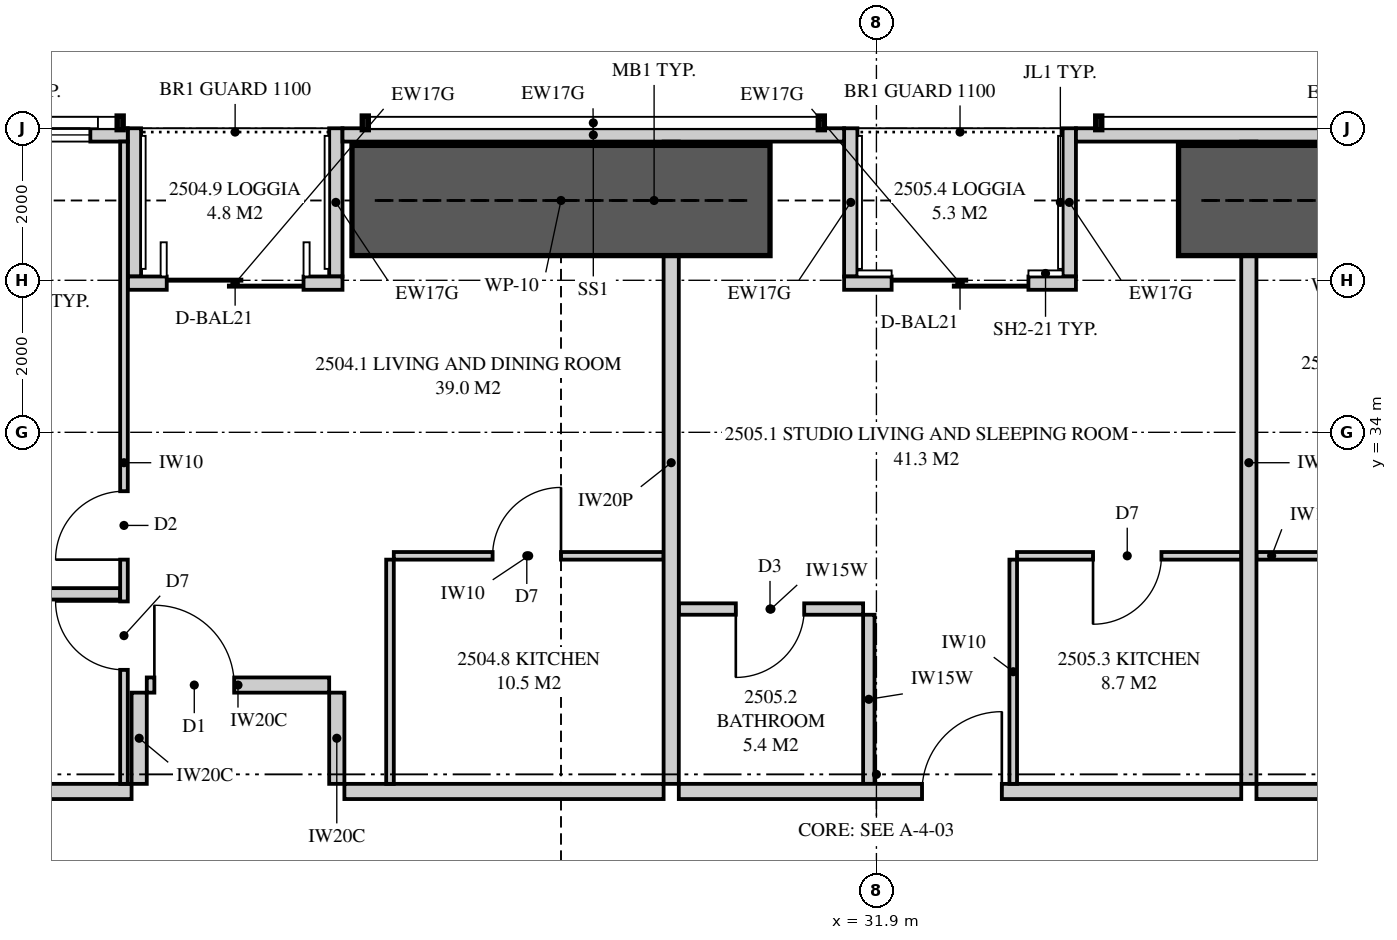
"""IFC4 building model, lengths in metres.
Left out: names, types, materials, properties, quantities, classifications, styles, units other than length and angle.
Written with IfcOpenShell. Run it as: python <this file> out.ifc"""

import sys

from ifc_helpers import new_model, si_unit, direction, frame, frame_2d, origin, place, context, subcontext, project, spatial, polyline, rectangle, outline, extrude, element, fill, save


model = new_model("IFC4")
c1 = context("Model", 3, precision=1e-05, world=origin(), true_north=direction((0.0, 1.0)))
c2 = subcontext(c1, "Body", "Model", "MODEL_VIEW")
j1 = project(units=[si_unit("LENGTHUNIT", "METRE"), si_unit("PLANEANGLEUNIT", "RADIAN")], contexts=[c1])
p1 = place(None, origin())
s1 = spatial("IfcSite", under=j1, at=p1, CompositionType="ELEMENT")
p2 = place(p1, origin())
s2 = spatial("IfcBuilding", under=s1, at=p2, CompositionType="ELEMENT")
p3 = place(p2, frame((0.0, 0.0, 94.8)))
s3 = spatial("IfcBuildingStorey", under=s2, at=p3, CompositionType="ELEMENT", Elevation=94.8)
p4 = place(p3, frame((41.449, 37.913, 0.0), z_axis=(0.0, 0.0, 1.0), x_axis=(-1.0, 0.0, 0.0)))
e1 = element("IfcWall", 1, at=p4, inside=s3, PredefinedType="SOLIDWALL", context=c2, shape_type="SweptSolid", body=[
    extrude(outline(polyline([(0.0, 0.0), (6.924, 0.0), (6.924, 2.15), (2.824, 2.15), (2.824, 3.11), (2.666, 3.11), (2.666, 2.15), (2.62, 2.15), (2.62, 3.11), (0.0, 3.11), (0.0, 0.0)])), frame((0.0, 0.087, 0.0), z_axis=(0.0, -1.0, 0.0), x_axis=(1.0, 0.0, 0.0)), (0.0, 0.0, 1.0), 0.175),
])
p5 = place(p3, frame((31.475, 37.913, 0.0), z_axis=(0.0, 0.0, 1.0), x_axis=(-1.0, 0.0, 0.0)))
e2 = element("IfcWall", 2, at=p5, inside=s3, PredefinedType="SOLIDWALL", context=c2, shape_type="SweptSolid", body=[
    extrude(rectangle(XDim=6.6, YDim=0.175, at=frame_2d((3.3, 0.0))), origin(), (0.0, 0.0, 1.0), 2.15),
])
p6 = place(p3, frame((22.05, 37.913, 0.0), z_axis=(0.0, 0.0, 1.0), x_axis=(-1.0, 0.0, 0.0)))
e3 = element("IfcWall", 3, at=p6, inside=s3, PredefinedType="SOLIDWALL", context=c2, shape_type="SweptSolid", body=[
    extrude(outline(polyline([(0.0, 0.0), (12.999, 0.0), (12.999, 3.11), (5.378, 3.11), (5.378, 2.15), (5.333, 2.15), (5.333, 3.11), (5.175, 3.11), (5.175, 2.15), (0.0, 2.15), (0.0, 0.0)])), frame((0.0, 0.087, 0.0), z_axis=(0.0, -1.0, 0.0), x_axis=(1.0, 0.0, 0.0)), (0.0, 0.0, 1.0), 0.175),
])
p7 = place(p6, frame((0.492, 0.0, 0.4)))
e4 = element("IfcOpeningElement", 4, at=p7, cuts=e3, PredefinedType="OPENING", context=c2, shape_type="SweptSolid", body=[
    extrude(rectangle(XDim=1.8, YDim=1.7, at=frame_2d((0.9, 0.85))), frame((0.0, 0.097, 0.0), z_axis=(0.0, -1.0, 0.0), x_axis=(1.0, 0.0, 0.0)), (0.0, 0.0, 1.0), 0.195),
])
p8 = place(p6, frame((8.065, 0.0, 0.4)))
e5 = element("IfcOpeningElement", 5, at=p8, cuts=e3, PredefinedType="OPENING", context=c2, shape_type="SweptSolid", body=[
    extrude(rectangle(XDim=1.8, YDim=1.7, at=frame_2d((0.9, 0.85))), frame((0.0, 0.097, 0.0), z_axis=(0.0, -1.0, 0.0), x_axis=(1.0, 0.0, 0.0)), (0.0, 0.0, 1.0), 0.195),
])
p9 = place(p3, frame((34.525, 35.962, 0.0), z_axis=(0.0, 0.0, 1.0), x_axis=(-1.0, 0.0, 0.0)))
e6 = element("IfcWall", 6, at=p9, inside=s3, PredefinedType="SOLIDWALL", context=c2, shape_type="SweptSolid", body=[
    extrude(rectangle(XDim=3.05, YDim=0.175, at=frame_2d((1.525, 0.0))), origin(), (0.0, 0.0, 1.0), 3.11),
])
p10 = place(p9, frame((0.625, 0.0, 0.0)))
e7 = element("IfcOpeningElement", 7, at=p10, cuts=e6, PredefinedType="OPENING", context=c2, shape_type="SweptSolid", body=[
    extrude(rectangle(XDim=1.8, YDim=2.1, at=frame_2d((0.9, 1.05))), frame((0.0, 0.097, 0.0), z_axis=(0.0, -1.0, 0.0), x_axis=(1.0, 0.0, 0.0)), (0.0, 0.0, 1.0), 0.195),
])
for number, where, z_axis, x_axis in (
    (8, (34.438, 38.0, 0.0), (0.0, 0.0, 1.0), (0.0, -1.0, 0.0)),
    (9, (31.562, 38.0, 0.0), (0.0, 0.0, 1.0), (0.0, -1.0, 0.0)),
):
    element("IfcWall", number, at=place(p3, frame(where, z_axis=z_axis, x_axis=x_axis)), inside=s3, PredefinedType="SOLIDWALL", context=c2, shape_type="SweptSolid", body=[
        extrude(outline(polyline([(0.0, 0.0), (1.95, 0.0), (1.95, 3.11), (1.75, 3.11), (1.75, 2.15), (0.15, 2.15), (0.15, 3.11), (0.0, 3.11), (0.0, 0.0)])), frame((0.0, 0.087, 0.0), z_axis=(0.0, -1.0, 0.0), x_axis=(1.0, 0.0, 0.0)), (0.0, 0.0, 1.0), 0.175),
    ])
p11 = place(p3, frame((24.875, 35.962, 0.0), z_axis=(0.0, 0.0, 1.0), x_axis=(-1.0, 0.0, 0.0)))
e10 = element("IfcWall", 10, at=p11, inside=s3, PredefinedType="SOLIDWALL", context=c2, shape_type="SweptSolid", body=[
    extrude(rectangle(XDim=2.825, YDim=0.175, at=frame_2d((1.413, 0.0))), origin(), (0.0, 0.0, 1.0), 3.11),
])
p12 = place(p11, frame((0.512, 0.0, 0.0)))
e11 = element("IfcOpeningElement", 11, at=p12, cuts=e10, PredefinedType="OPENING", context=c2, shape_type="SweptSolid", body=[
    extrude(rectangle(XDim=1.8, YDim=2.1, at=frame_2d((0.9, 1.05))), frame((0.0, 0.097, 0.0), z_axis=(0.0, -1.0, 0.0), x_axis=(1.0, 0.0, 0.0)), (0.0, 0.0, 1.0), 0.195),
])
for number, where, z_axis, x_axis in (
    (12, (24.788, 38.0, 0.0), (0.0, 0.0, 1.0), (0.0, -1.0, 0.0)),
    (13, (22.137, 38.0, 0.0), (0.0, 0.0, 1.0), (0.0, -1.0, 0.0)),
):
    element("IfcWall", number, at=place(p3, frame(where, z_axis=z_axis, x_axis=x_axis)), inside=s3, PredefinedType="SOLIDWALL", context=c2, shape_type="SweptSolid", body=[
        extrude(outline(polyline([(0.0, 0.0), (1.95, 0.0), (1.95, 3.11), (1.75, 3.11), (1.75, 2.15), (0.15, 2.15), (0.15, 3.11), (0.0, 3.11), (0.0, 0.0)])), frame((0.0, 0.087, 0.0), z_axis=(0.0, -1.0, 0.0), x_axis=(1.0, 0.0, 0.0)), (0.0, 0.0, 1.0), 0.175),
    ])
p13 = place(p3, frame((29.2, 37.825, 0.0), z_axis=(0.0, 0.0, 1.0), x_axis=(0.0, -1.0, 0.0)))
e14 = element("IfcWall", 14, at=p13, inside=s3, PredefinedType="PARTITIONING", context=c2, shape_type="SweptSolid", body=[
    extrude(outline(polyline([(0.529, 2.15), (0.0, 2.15), (0.0, 0.0), (0.529, 0.0), (0.529, 0.513), (1.021, 0.513), (1.021, 0.0), (8.45, 0.0), (8.45, 3.11), (1.685, 3.11), (1.685, 2.15), (1.021, 2.15), (1.021, 1.637), (0.529, 1.637), (0.529, 2.15)])), frame((0.0, 0.1, 0.0), z_axis=(0.0, -1.0, 0.0), x_axis=(1.0, 0.0, 0.0)), (0.0, 0.0, 1.0), 0.2),
])
p14 = place(p3, frame((17.775, 29.275, 0.0), z_axis=(0.0, 0.0, 1.0), x_axis=(1.0, 0.0, 0.0)))
e15 = element("IfcWall", 15, at=p14, inside=s3, PredefinedType="PARTITIONING", context=c2, shape_type="SweptSolid", body=[
    extrude(rectangle(XDim=4.325, YDim=0.2, at=frame_2d((2.163, 0.0))), origin(), (0.0, 0.0, 1.0), 3.11),
])
p15 = place(p3, frame((22.0, 37.825, 0.0), z_axis=(0.0, 0.0, 1.0), x_axis=(0.0, -1.0, 0.0)))
e16 = element("IfcWall", 16, at=p15, inside=s3, PredefinedType="PARTITIONING", context=c2, shape_type="SweptSolid", body=[
    extrude(outline(polyline([(0.0, 0.0), (8.45, 0.0), (8.45, 3.11), (1.635, 3.11), (1.635, 2.15), (0.0, 2.15), (0.0, 3.11), (0.0, 0.0)])), frame((0.0, 0.05, 0.0), z_axis=(0.0, -1.0, 0.0), x_axis=(1.0, 0.0, 0.0)), (0.0, 0.0, 1.0), 0.1),
])
p16 = place(p15, frame((4.6, 0.0, 0.0)))
e17 = element("IfcOpeningElement", 17, at=p16, cuts=e16, PredefinedType="OPENING", context=c2, shape_type="SweptSolid", body=[
    extrude(rectangle(XDim=0.9, YDim=2.1, at=frame_2d((0.45, 1.05))), frame((0.0, 0.06, 0.0), z_axis=(0.0, -1.0, 0.0), x_axis=(1.0, 0.0, 0.0)), (0.0, 0.0, 1.0), 0.12),
])
p17 = place(p15, frame((6.05, 0.0, 0.0)))
e18 = element("IfcOpeningElement", 18, at=p17, cuts=e16, PredefinedType="OPENING", context=c2, shape_type="SweptSolid", body=[
    extrude(rectangle(XDim=0.9, YDim=2.1, at=frame_2d((0.45, 1.05))), frame((0.0, 0.06, 0.0), z_axis=(0.0, -1.0, 0.0), x_axis=(1.0, 0.0, 0.0)), (0.0, 0.0, 1.0), 0.12),
])
p18 = place(p3, frame((17.75, 31.875, 0.0), z_axis=(0.0, 0.0, 1.0), x_axis=(1.0, 0.0, 0.0)))
e19 = element("IfcWall", 19, at=p18, inside=s3, PredefinedType="PLUMBINGWALL", context=c2, shape_type="SweptSolid", body=[
    extrude(rectangle(XDim=4.2, YDim=0.15, at=frame_2d((2.1, 0.0))), origin(), (0.0, 0.0, 1.0), 3.11),
])
p19 = place(p3, frame((25.55, 32.375, 0.0), z_axis=(0.0, 0.0, 1.0), x_axis=(1.0, 0.0, 0.0)))
e20 = element("IfcWall", 20, at=p19, inside=s3, PredefinedType="PARTITIONING", context=c2, shape_type="SweptSolid", body=[
    extrude(outline(polyline([(0.0, 0.0), (3.55, 0.0), (3.55, 3.11), (2.487, 3.11), (2.487, 2.541), (1.913, 2.541), (1.913, 3.11), (0.0, 3.11), (0.0, 0.0)])), frame((0.0, 0.05, 0.0), z_axis=(0.0, -1.0, 0.0), x_axis=(1.0, 0.0, 0.0)), (0.0, 0.0, 1.0), 0.1),
])
p20 = place(p19, frame((1.3, 0.0, 0.0)))
e21 = element("IfcOpeningElement", 21, at=p20, cuts=e20, PredefinedType="OPENING", context=c2, shape_type="SweptSolid", body=[
    extrude(rectangle(XDim=0.9, YDim=2.1, at=frame_2d((0.45, 1.05))), frame((0.0, 0.06, 0.0), z_axis=(0.0, -1.0, 0.0), x_axis=(1.0, 0.0, 0.0)), (0.0, 0.0, 1.0), 0.12),
])
p21 = place(p3, frame((25.5, 32.325, 0.0), z_axis=(0.0, 0.0, 1.0), x_axis=(0.0, -1.0, 0.0)))
e22 = element("IfcWall", 22, at=p21, inside=s3, PredefinedType="PARTITIONING", context=c2, shape_type="SweptSolid", body=[
    extrude(rectangle(XDim=2.95, YDim=0.1, at=frame_2d((1.475, 0.0))), origin(), (0.0, 0.0, 1.0), 3.11),
])
p22 = place(p3, frame((36.8, 37.825, 0.0), z_axis=(0.0, 0.0, 1.0), x_axis=(0.0, -1.0, 0.0)))
e23 = element("IfcWall", 23, at=p22, inside=s3, PredefinedType="PARTITIONING", context=c2, shape_type="SweptSolid", body=[
    extrude(outline(polyline([(0.529, 2.15), (0.0, 2.15), (0.0, 0.0), (0.529, 0.0), (0.529, 0.256), (1.021, 0.256), (1.021, 0.0), (8.45, 0.0), (8.45, 3.11), (1.685, 3.11), (1.685, 2.15), (1.021, 2.15), (1.021, 1.894), (0.529, 1.894), (0.529, 2.15)])), frame((0.0, 0.1, 0.0), z_axis=(0.0, -1.0, 0.0), x_axis=(1.0, 0.0, 0.0)), (0.0, 0.0, 1.0), 0.2),
])
p23 = place(p3, frame((29.3, 29.275, 0.0), z_axis=(0.0, 0.0, 1.0), x_axis=(1.0, 0.0, 0.0)))
e24 = element("IfcWall", 24, at=p23, inside=s3, PredefinedType="PARTITIONING", context=c2, shape_type="SweptSolid", body=[
    extrude(rectangle(XDim=7.4, YDim=0.2, at=frame_2d((3.7, 0.0))), origin(), (0.0, 0.0, 1.0), 3.11),
])
p24 = place(p23, frame((3.2, 0.0, 0.0)))
e25 = element("IfcOpeningElement", 25, at=p24, cuts=e24, PredefinedType="OPENING", context=c2, shape_type="SweptSolid", body=[
    extrude(rectangle(XDim=1.05, YDim=2.2, at=frame_2d((0.525, 1.1))), frame((0.0, 0.11, 0.0), z_axis=(0.0, -1.0, 0.0), x_axis=(1.0, 0.0, 0.0)), (0.0, 0.0, 1.0), 0.22),
])
p25 = place(p3, frame((29.3, 31.675, 0.0), z_axis=(0.0, 0.0, 1.0), x_axis=(1.0, 0.0, 0.0)))
e26 = element("IfcWall", 26, at=p25, inside=s3, PredefinedType="PLUMBINGWALL", context=c2, shape_type="SweptSolid", body=[
    extrude(rectangle(XDim=2.425, YDim=0.15, at=frame_2d((1.212, 0.0))), origin(), (0.0, 0.0, 1.0), 3.11),
])
p26 = place(p25, frame((0.75, 0.0, 0.0)))
e27 = element("IfcOpeningElement", 27, at=p26, cuts=e26, PredefinedType="OPENING", context=c2, shape_type="SweptSolid", body=[
    extrude(rectangle(XDim=0.9, YDim=2.1, at=frame_2d((0.45, 1.05))), frame((0.0, 0.085, 0.0), z_axis=(0.0, -1.0, 0.0), x_axis=(1.0, 0.0, 0.0)), (0.0, 0.0, 1.0), 0.17),
])
p27 = place(p3, frame((31.8, 31.6, 0.0), z_axis=(0.0, 0.0, 1.0), x_axis=(0.0, -1.0, 0.0)))
e28 = element("IfcWall", 28, at=p27, inside=s3, PredefinedType="PLUMBINGWALL", context=c2, shape_type="SweptSolid", body=[
    extrude(rectangle(XDim=2.225, YDim=0.15, at=frame_2d((1.113, 0.0))), origin(), (0.0, 0.0, 1.0), 3.11),
])
p28 = place(p3, frame((33.75, 32.375, 0.0), z_axis=(0.0, 0.0, 1.0), x_axis=(1.0, 0.0, 0.0)))
e29 = element("IfcWall", 29, at=p28, inside=s3, PredefinedType="PARTITIONING", context=c2, shape_type="SweptSolid", body=[
    extrude(rectangle(XDim=2.95, YDim=0.1, at=frame_2d((1.475, 0.0))), origin(), (0.0, 0.0, 1.0), 3.11),
])
p29 = place(p28, frame((1.0, 0.0, 0.0)))
e30 = element("IfcOpeningElement", 30, at=p29, cuts=e29, PredefinedType="OPENING", context=c2, shape_type="SweptSolid", body=[
    extrude(rectangle(XDim=0.9, YDim=2.1, at=frame_2d((0.45, 1.05))), frame((0.0, 0.06, 0.0), z_axis=(0.0, -1.0, 0.0), x_axis=(1.0, 0.0, 0.0)), (0.0, 0.0, 1.0), 0.12),
])
p30 = place(p3, frame((33.7, 32.325, 0.0), z_axis=(0.0, 0.0, 1.0), x_axis=(0.0, -1.0, 0.0)))
e31 = element("IfcWall", 31, at=p30, inside=s3, PredefinedType="PARTITIONING", context=c2, shape_type="SweptSolid", body=[
    extrude(rectangle(XDim=2.95, YDim=0.1, at=frame_2d((1.475, 0.0))), origin(), (0.0, 0.0, 1.0), 3.11),
])
p31 = place(p3, frame((36.9, 29.275, 0.0), z_axis=(0.0, 0.0, 1.0), x_axis=(1.0, 0.0, 0.0)))
e32 = element("IfcWall", 32, at=p31, inside=s3, PredefinedType="PARTITIONING", context=c2, shape_type="SweptSolid", body=[
    extrude(outline(polyline([(0.0, 0.0), (9.125, 0.0), (9.125, 3.11), (2.062, 3.11), (2.062, 2.541), (1.388, 2.541), (1.388, 3.11), (0.0, 3.11), (0.0, 0.0)])), frame((0.0, 0.1, 0.0), z_axis=(0.0, -1.0, 0.0), x_axis=(1.0, 0.0, 0.0)), (0.0, 0.0, 1.0), 0.2),
])
p32 = place(p31, frame((4.5, 0.0, 0.0)))
e33 = element("IfcOpeningElement", 33, at=p32, cuts=e32, PredefinedType="OPENING", context=c2, shape_type="SweptSolid", body=[
    extrude(rectangle(XDim=1.05, YDim=2.2, at=frame_2d((0.525, 1.1))), frame((0.0, 0.11, 0.0), z_axis=(0.0, -1.0, 0.0), x_axis=(1.0, 0.0, 0.0)), (0.0, 0.0, 1.0), 0.22),
])
p33 = place(p3, frame((36.9, 32.375, 0.0), z_axis=(0.0, 0.0, 1.0), x_axis=(1.0, 0.0, 0.0)))
e34 = element("IfcWall", 34, at=p33, inside=s3, PredefinedType="PARTITIONING", context=c2, shape_type="SweptSolid", body=[
    extrude(outline(polyline([(0.0, 0.0), (3.55, 0.0), (3.55, 3.11), (2.012, 3.11), (2.012, 2.541), (1.438, 2.541), (1.438, 3.11), (0.0, 3.11), (0.0, 0.0)])), frame((0.0, 0.05, 0.0), z_axis=(0.0, -1.0, 0.0), x_axis=(1.0, 0.0, 0.0)), (0.0, 0.0, 1.0), 0.1),
])
p34 = place(p33, frame((1.35, 0.0, 0.0)))
e35 = element("IfcOpeningElement", 35, at=p34, cuts=e34, PredefinedType="OPENING", context=c2, shape_type="SweptSolid", body=[
    extrude(rectangle(XDim=0.9, YDim=2.1, at=frame_2d((0.45, 1.05))), frame((0.0, 0.06, 0.0), z_axis=(0.0, -1.0, 0.0), x_axis=(1.0, 0.0, 0.0)), (0.0, 0.0, 1.0), 0.12),
])
p35 = place(p3, frame((24.9, 29.275, 0.0), z_axis=(0.0, 0.0, 1.0), x_axis=(1.0, 0.0, 0.0)))
e36 = element("IfcWall", 36, at=p35, inside=s3, PredefinedType="PARTITIONING", context=c2, shape_type="SweptSolid", body=[
    extrude(outline(polyline([(0.0, 0.0), (4.2, 0.0), (4.2, 3.11), (3.187, 3.11), (3.187, 2.541), (2.513, 2.541), (2.513, 3.11), (0.0, 3.11), (0.0, 0.0)])), frame((0.0, 0.1, 0.0), z_axis=(0.0, -1.0, 0.0), x_axis=(1.0, 0.0, 0.0)), (0.0, 0.0, 1.0), 0.2),
])
p36 = place(p3, frame((22.3, 30.675, 0.0), z_axis=(0.0, 0.0, 1.0), x_axis=(1.0, 0.0, 0.0)))
e37 = element("IfcWall", 37, at=p36, inside=s3, PredefinedType="PARTITIONING", context=c2, shape_type="SweptSolid", body=[
    extrude(rectangle(XDim=2.4, YDim=0.2, at=frame_2d((1.2, 0.0))), origin(), (0.0, 0.0, 1.0), 3.11),
])
p37 = place(p36, frame((0.1, 0.0, 0.0)))
e38 = element("IfcOpeningElement", 38, at=p37, cuts=e37, PredefinedType="OPENING", context=c2, shape_type="SweptSolid", body=[
    extrude(rectangle(XDim=1.05, YDim=2.2, at=frame_2d((0.525, 1.1))), frame((0.0, 0.11, 0.0), z_axis=(0.0, -1.0, 0.0), x_axis=(1.0, 0.0, 0.0)), (0.0, 0.0, 1.0), 0.22),
])
for number, where, z_axis, x_axis in (
    (39, (22.2, 29.375, 0.0), (0.0, 0.0, 1.0), (0.0, 1.0, 0.0)),
    (40, (24.8, 29.375, 0.0), (0.0, 0.0, 1.0), (0.0, 1.0, 0.0)),
):
    element("IfcWall", number, at=place(p3, frame(where, z_axis=z_axis, x_axis=x_axis)), inside=s3, PredefinedType="PARTITIONING", context=c2, shape_type="SweptSolid", body=[
        extrude(rectangle(XDim=1.2, YDim=0.2, at=frame_2d((0.6, 0.0))), origin(), (0.0, 0.0, 1.0), 3.11),
    ])
for number, where, z_axis, x_axis in (
    (41, (35.875, 37.05, 0.0), (0.0, 0.0, 1.0), (1.0, 0.0, 0.0)),
    (42, (25.0, 37.05, 0.0), (0.0, 0.0, 1.0), (1.0, 0.0, 0.0)),
):
    element("IfcWall", number, at=place(p3, frame(where, z_axis=z_axis, x_axis=x_axis)), inside=s3, PredefinedType="SHEAR", context=c2, shape_type="SweptSolid", body=[
        extrude(rectangle(XDim=5.5, YDim=1.45, at=frame_2d((2.75, 0.0))), origin(), (0.0, 0.0, 1.0), 3.35),
    ])
p38 = place(p10, origin())
e43 = element("IfcDoor", 43, at=p38, inside=s3, OperationType="SLIDING_TO_LEFT", PredefinedType="DOOR", context=c2, shape_type="SweptSolid", body=[
    extrude(rectangle(XDim=1.8, YDim=2.1, at=frame_2d((0.9, 1.05))), frame((0.0, 0.025, 0.0), z_axis=(0.0, -1.0, 0.0), x_axis=(1.0, 0.0, 0.0)), (0.0, 0.0, 1.0), 0.05),
])
fill(e7, e43)
p39 = place(p12, origin())
e44 = element("IfcDoor", 44, at=p39, inside=s3, OperationType="SLIDING_TO_LEFT", PredefinedType="DOOR", context=c2, shape_type="SweptSolid", body=[
    extrude(rectangle(XDim=1.8, YDim=2.1, at=frame_2d((0.9, 1.05))), frame((0.0, 0.025, 0.0), z_axis=(0.0, -1.0, 0.0), x_axis=(1.0, 0.0, 0.0)), (0.0, 0.0, 1.0), 0.05),
])
fill(e11, e44)
p40 = place(p7, origin())
e45 = element("IfcWindow", 45, at=p40, inside=s3, PartitioningType="SINGLE_PANEL", PredefinedType="WINDOW", context=c2, shape_type="SweptSolid", body=[
    extrude(rectangle(XDim=1.8, YDim=1.7, at=frame_2d((0.9, 0.85))), frame((0.0, 0.03, 0.0), z_axis=(0.0, -1.0, 0.0), x_axis=(1.0, 0.0, 0.0)), (0.0, 0.0, 1.0), 0.06),
])
fill(e4, e45)
p41 = place(p37, origin())
e46 = element("IfcDoor", 46, at=p41, inside=s3, OperationType="SINGLE_SWING_LEFT", PredefinedType="DOOR", context=c2, shape_type="SweptSolid", body=[
    extrude(rectangle(XDim=1.05, YDim=2.2, at=frame_2d((0.525, 1.1))), frame((0.0, 0.025, 0.0), z_axis=(0.0, -1.0, 0.0), x_axis=(1.0, 0.0, 0.0)), (0.0, 0.0, 1.0), 0.05),
])
fill(e38, e46)
p42 = place(p16, frame((0.9, 0.0, 0.0), z_axis=(0.0, 0.0, 1.0), x_axis=(-1.0, 0.0, 0.0)))
e47 = element("IfcDoor", 47, at=p42, inside=s3, OperationType="SINGLE_SWING_LEFT", PredefinedType="DOOR", context=c2, shape_type="SweptSolid", body=[
    extrude(rectangle(XDim=0.9, YDim=2.1, at=frame_2d((0.45, 1.05))), frame((0.0, 0.025, 0.0), z_axis=(0.0, -1.0, 0.0), x_axis=(1.0, 0.0, 0.0)), (0.0, 0.0, 1.0), 0.05),
])
fill(e17, e47)
p43 = place(p17, frame((0.9, 0.0, 0.0), z_axis=(0.0, 0.0, 1.0), x_axis=(-1.0, 0.0, 0.0)))
e48 = element("IfcDoor", 48, at=p43, inside=s3, OperationType="SINGLE_SWING_RIGHT", PredefinedType="DOOR", context=c2, shape_type="SweptSolid", body=[
    extrude(rectangle(XDim=0.9, YDim=2.1, at=frame_2d((0.45, 1.05))), frame((0.0, 0.025, 0.0), z_axis=(0.0, -1.0, 0.0), x_axis=(1.0, 0.0, 0.0)), (0.0, 0.0, 1.0), 0.05),
])
fill(e18, e48)
p44 = place(p20, origin())
e49 = element("IfcDoor", 49, at=p44, inside=s3, OperationType="SINGLE_SWING_RIGHT", PredefinedType="DOOR", context=c2, shape_type="SweptSolid", body=[
    extrude(rectangle(XDim=0.9, YDim=2.1, at=frame_2d((0.45, 1.05))), frame((0.0, 0.025, 0.0), z_axis=(0.0, -1.0, 0.0), x_axis=(1.0, 0.0, 0.0)), (0.0, 0.0, 1.0), 0.05),
])
fill(e21, e49)
p45 = place(p24, origin())
e50 = element("IfcDoor", 50, at=p45, inside=s3, OperationType="SINGLE_SWING_RIGHT", PredefinedType="DOOR", context=c2, shape_type="SweptSolid", body=[
    extrude(rectangle(XDim=1.05, YDim=2.2, at=frame_2d((0.525, 1.1))), frame((0.0, 0.025, 0.0), z_axis=(0.0, -1.0, 0.0), x_axis=(1.0, 0.0, 0.0)), (0.0, 0.0, 1.0), 0.05),
])
fill(e25, e50)
p46 = place(p26, frame((0.9, 0.0, 0.0), z_axis=(0.0, 0.0, 1.0), x_axis=(-1.0, 0.0, 0.0)))
e51 = element("IfcDoor", 51, at=p46, inside=s3, OperationType="SINGLE_SWING_RIGHT", PredefinedType="DOOR", context=c2, shape_type="SweptSolid", body=[
    extrude(rectangle(XDim=0.9, YDim=2.1, at=frame_2d((0.45, 1.05))), frame((0.0, 0.025, 0.0), z_axis=(0.0, -1.0, 0.0), x_axis=(1.0, 0.0, 0.0)), (0.0, 0.0, 1.0), 0.05),
])
fill(e27, e51)
p47 = place(p29, frame((0.9, 0.0, 0.0), z_axis=(0.0, 0.0, 1.0), x_axis=(-1.0, 0.0, 0.0)))
e52 = element("IfcDoor", 52, at=p47, inside=s3, OperationType="SINGLE_SWING_RIGHT", PredefinedType="DOOR", context=c2, shape_type="SweptSolid", body=[
    extrude(rectangle(XDim=0.9, YDim=2.1, at=frame_2d((0.45, 1.05))), frame((0.0, 0.025, 0.0), z_axis=(0.0, -1.0, 0.0), x_axis=(1.0, 0.0, 0.0)), (0.0, 0.0, 1.0), 0.05),
])
fill(e30, e52)
save(model, sys.argv[1])
